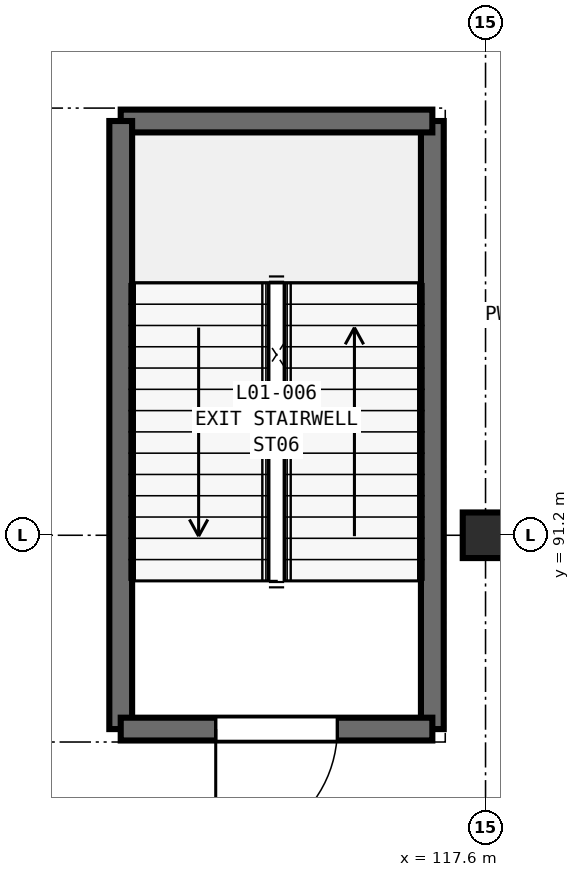
"""IFC4 building model, lengths in metres.
Left out: names, types, materials, properties, quantities, classifications, styles, units other than length and angle.
Written with IfcOpenShell. Run it as: python <this file> out.ifc"""

import sys

from ifc_helpers import new_model, si_unit, direction, frame, frame_2d, origin, origin_2d, place, context, subcontext, project, spatial, rectangle, extrude, element, fill, save


model = new_model("IFC4")
c1 = context("Model", 3, precision=1e-05, world=origin(), true_north=direction((0.0, 1.0)))
c2 = subcontext(c1, "Body", "Model", "MODEL_VIEW")
j1 = project(units=[si_unit("LENGTHUNIT", "METRE"), si_unit("PLANEANGLEUNIT", "RADIAN")], contexts=[c1])
p1 = place(None, origin())
s1 = spatial("IfcSite", under=j1, at=p1, CompositionType="ELEMENT")
p2 = place(p1, origin())
s2 = spatial("IfcBuilding", under=s1, at=p2, CompositionType="ELEMENT")
p3 = place(p2, frame((0.0, 0.0, 5.4)))
s3 = spatial("IfcBuildingStorey", under=s2, at=p3, CompositionType="ELEMENT", Elevation=5.4)
p4 = place(p3, frame((117.6, 91.2, 0.0), z_axis=(0.0, 0.0, 1.0), x_axis=(1.0, 0.0, 0.0)))
e1 = element("IfcColumn", 1, at=p4, inside=s3, PredefinedType="COLUMN", context=c2, shape_type="SweptSolid", body=[
    extrude(rectangle(XDim=0.6, YDim=0.6, at=origin_2d()), origin(), (0.0, 0.0, 1.0), 5.4),
])
p5 = place(p3, frame((116.9, 88.65, 0.0), z_axis=(0.0, 0.0, 1.0), x_axis=(0.0, 1.0, 0.0)))
e2 = element("IfcWall", 2, at=p5, inside=s3, PredefinedType="SHEAR", context=c2, shape_type="SweptSolid", body=[
    extrude(rectangle(XDim=8.0, YDim=0.3, at=frame_2d((4.0, 0.0))), origin(), (0.0, 0.0, 1.0), 5.4),
])
p6 = place(p3, frame((116.9, 96.65, 0.0), z_axis=(0.0, 0.0, 1.0), x_axis=(-1.0, 0.0, 0.0)))
e3 = element("IfcWall", 3, at=p6, inside=s3, PredefinedType="SHEAR", context=c2, shape_type="SweptSolid", body=[
    extrude(rectangle(XDim=4.1, YDim=0.3, at=frame_2d((2.05, 0.0))), origin(), (0.0, 0.0, 1.0), 5.4),
])
p7 = place(p3, frame((112.8, 96.65, 0.0), z_axis=(0.0, 0.0, 1.0), x_axis=(0.0, -1.0, 0.0)))
e4 = element("IfcWall", 4, at=p7, inside=s3, PredefinedType="SHEAR", context=c2, shape_type="SweptSolid", body=[
    extrude(rectangle(XDim=8.0, YDim=0.3, at=frame_2d((4.0, 0.0))), origin(), (0.0, 0.0, 1.0), 5.4),
])
p8 = place(p3, frame((112.8, 88.65, 0.0), z_axis=(0.0, 0.0, 1.0), x_axis=(1.0, 0.0, 0.0)))
e5 = element("IfcWall", 5, at=p8, inside=s3, PredefinedType="SHEAR", context=c2, shape_type="SweptSolid", body=[
    extrude(rectangle(XDim=4.1, YDim=0.3, at=frame_2d((2.05, 0.0))), origin(), (0.0, 0.0, 1.0), 5.4),
])
p9 = place(p8, frame((1.25, 0.0, 0.0)))
e6 = element("IfcOpeningElement", 6, at=p9, cuts=e5, PredefinedType="OPENING", context=c2, shape_type="SweptSolid", body=[
    extrude(rectangle(XDim=1.6, YDim=2.25, at=frame_2d((0.8, 1.125))), frame((0.0, 0.16, 0.0), z_axis=(0.0, -1.0, 0.0), x_axis=(1.0, 0.0, 0.0)), (0.0, 0.0, 1.0), 0.32),
])
p10 = place(p9, frame((1.6, 0.0, 0.0), z_axis=(0.0, 0.0, 1.0), x_axis=(-1.0, 0.0, 0.0)))
e7 = element("IfcDoor", 7, at=p10, inside=s3, OperationType="SINGLE_SWING_RIGHT", PredefinedType="DOOR", context=c2, shape_type="SweptSolid", body=[
    extrude(rectangle(XDim=1.6, YDim=2.25, at=frame_2d((0.8, 1.125))), frame((0.0, 0.025, 0.0), z_axis=(0.0, -1.0, 0.0), x_axis=(1.0, 0.0, 0.0)), (0.0, 0.0, 1.0), 0.05),
])
fill(e6, e7)
save(model, sys.argv[1])
